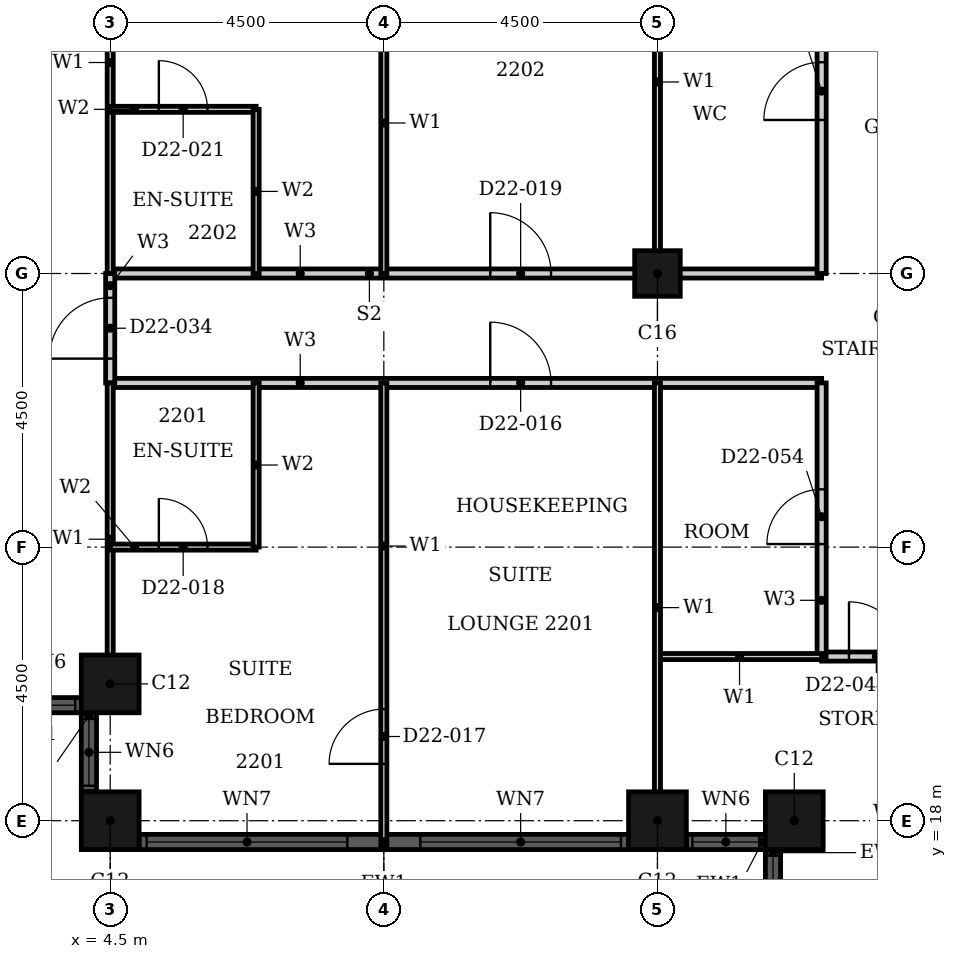
"""IFC4 building model, lengths in metres.
Left out: names, types, materials, properties, quantities, classifications, styles, units other than length and angle.
Written with IfcOpenShell. Run it as: python <this file> out.ifc"""

import sys

from ifc_helpers import new_model, si_unit, direction, frame, frame_2d, origin, origin_2d, place, context, subcontext, project, spatial, rectangle, hollow_rectangle, extrude, element, fill, save


model = new_model("IFC4")
c1 = context("Model", 3, precision=1e-05, world=origin(), true_north=direction((0.0, 1.0)))
c2 = subcontext(c1, "Body", "Model", "MODEL_VIEW")
j1 = project(units=[si_unit("LENGTHUNIT", "METRE"), si_unit("PLANEANGLEUNIT", "RADIAN")], contexts=[c1])
p1 = place(None, origin())
s1 = spatial("IfcSite", under=j1, at=p1, CompositionType="ELEMENT")
p2 = place(p1, origin())
s2 = spatial("IfcBuilding", under=s1, at=p2, CompositionType="ELEMENT")
p3 = place(p2, frame((0.0, 0.0, 92.4)))
s3 = spatial("IfcBuildingStorey", under=s2, at=p3, CompositionType="ELEMENT", Elevation=92.4)
for number, where, z_axis, x_axis in (
    (1, (4.5, 20.25, 0.0), (0.0, 0.0, 1.0), (1.0, 0.0, 0.0)),
    (2, (4.5, 18.0, 0.0), (0.0, 0.0, 1.0), (1.0, 0.0, 0.0)),
    (3, (13.5, 18.0, 0.0), (0.0, 0.0, 1.0), (1.0, 0.0, 0.0)),
    (4, (15.75, 18.0, 0.0), (0.0, 0.0, 1.0), (1.0, 0.0, 0.0)),
):
    element("IfcColumn", number, at=place(p3, frame(where, z_axis=z_axis, x_axis=x_axis)), inside=s3, PredefinedType="COLUMN", context=c2, shape_type="SweptSolid", body=[
        extrude(hollow_rectangle(XDim=0.95, YDim=0.95, WallThickness=0.03, at=origin_2d()), origin(), (0.0, 0.0, 1.0), 3.6),
    ])
p4 = place(p3, frame((13.5, 27.0, 0.0), z_axis=(0.0, 0.0, 1.0), x_axis=(1.0, 0.0, 0.0)))
e5 = element("IfcColumn", 5, at=p4, inside=s3, PredefinedType="COLUMN", context=c2, shape_type="SweptSolid", body=[
    extrude(hollow_rectangle(XDim=0.75, YDim=0.75, WallThickness=0.024, at=origin_2d()), origin(), (0.0, 0.0, 1.0), 3.6),
])
p5 = place(p3, frame((2.725, 19.9, 0.0), z_axis=(0.0, 0.0, 1.0), x_axis=(1.0, 0.0, 0.0)))
e6 = element("IfcWall", 6, at=p5, inside=s3, PredefinedType="SOLIDWALL", context=c2, shape_type="SweptSolid", body=[
    extrude(rectangle(XDim=1.3, YDim=0.25, at=frame_2d((0.65, 0.0))), origin(), (0.0, 0.0, 1.0), 3.6),
])
p6 = place(p5, frame((0.1, 0.0, 0.9)))
e7 = element("IfcOpeningElement", 7, at=p6, cuts=e6, PredefinedType="OPENING", context=c2, shape_type="SweptSolid", body=[
    extrude(rectangle(XDim=1.1, YDim=1.85, at=frame_2d((0.55, 0.925))), frame((0.0, 0.135, 0.0), z_axis=(0.0, -1.0, 0.0), x_axis=(1.0, 0.0, 0.0)), (0.0, 0.0, 1.0), 0.27),
])
p7 = place(p3, frame((4.15, 19.775, 0.0), z_axis=(0.0, 0.0, 1.0), x_axis=(0.0, -1.0, 0.0)))
e8 = element("IfcWall", 8, at=p7, inside=s3, PredefinedType="SOLIDWALL", context=c2, shape_type="SweptSolid", body=[
    extrude(rectangle(XDim=1.3, YDim=0.25, at=frame_2d((0.65, 0.0))), origin(), (0.0, 0.0, 1.0), 3.6),
])
p8 = place(p7, frame((0.1, 0.0, 0.9)))
e9 = element("IfcOpeningElement", 9, at=p8, cuts=e8, PredefinedType="OPENING", context=c2, shape_type="SweptSolid", body=[
    extrude(rectangle(XDim=1.1, YDim=1.85, at=frame_2d((0.55, 0.925))), frame((0.0, 0.135, 0.0), z_axis=(0.0, -1.0, 0.0), x_axis=(1.0, 0.0, 0.0)), (0.0, 0.0, 1.0), 0.27),
])
p9 = place(p3, frame((4.975, 17.65, 0.0), z_axis=(0.0, 0.0, 1.0), x_axis=(1.0, 0.0, 0.0)))
e10 = element("IfcWall", 10, at=p9, inside=s3, PredefinedType="SOLIDWALL", context=c2, shape_type="SweptSolid", body=[
    extrude(rectangle(XDim=8.05, YDim=0.25, at=frame_2d((4.025, 0.0))), origin(), (0.0, 0.0, 1.0), 3.6),
])
p10 = place(p9, frame((0.125, 0.0, 0.9)))
e11 = element("IfcOpeningElement", 11, at=p10, cuts=e10, PredefinedType="OPENING", context=c2, shape_type="SweptSolid", body=[
    extrude(rectangle(XDim=3.3, YDim=1.85, at=frame_2d((1.65, 0.925))), frame((0.0, 0.135, 0.0), z_axis=(0.0, -1.0, 0.0), x_axis=(1.0, 0.0, 0.0)), (0.0, 0.0, 1.0), 0.27),
])
p11 = place(p9, frame((4.625, 0.0, 0.9)))
e12 = element("IfcOpeningElement", 12, at=p11, cuts=e10, PredefinedType="OPENING", context=c2, shape_type="SweptSolid", body=[
    extrude(rectangle(XDim=3.3, YDim=1.85, at=frame_2d((1.65, 0.925))), frame((0.0, 0.135, 0.0), z_axis=(0.0, -1.0, 0.0), x_axis=(1.0, 0.0, 0.0)), (0.0, 0.0, 1.0), 0.27),
])
p12 = place(p3, frame((13.975, 17.65, 0.0), z_axis=(0.0, 0.0, 1.0), x_axis=(1.0, 0.0, 0.0)))
e13 = element("IfcWall", 13, at=p12, inside=s3, PredefinedType="SOLIDWALL", context=c2, shape_type="SweptSolid", body=[
    extrude(rectangle(XDim=1.3, YDim=0.25, at=frame_2d((0.65, 0.0))), origin(), (0.0, 0.0, 1.0), 3.6),
])
p13 = place(p12, frame((0.1, 0.0, 0.9)))
e14 = element("IfcOpeningElement", 14, at=p13, cuts=e13, PredefinedType="OPENING", context=c2, shape_type="SweptSolid", body=[
    extrude(rectangle(XDim=1.1, YDim=1.85, at=frame_2d((0.55, 0.925))), frame((0.0, 0.135, 0.0), z_axis=(0.0, -1.0, 0.0), x_axis=(1.0, 0.0, 0.0)), (0.0, 0.0, 1.0), 0.27),
])
p14 = place(p3, frame((15.4, 17.525, 0.0), z_axis=(0.0, 0.0, 1.0), x_axis=(0.0, -1.0, 0.0)))
e15 = element("IfcWall", 15, at=p14, inside=s3, PredefinedType="SOLIDWALL", context=c2, shape_type="SweptSolid", body=[
    extrude(rectangle(XDim=1.3, YDim=0.25, at=frame_2d((0.65, 0.0))), origin(), (0.0, 0.0, 1.0), 3.6),
])
p15 = place(p14, frame((0.1, 0.0, 0.9)))
e16 = element("IfcOpeningElement", 16, at=p15, cuts=e15, PredefinedType="OPENING", context=c2, shape_type="SweptSolid", body=[
    extrude(rectangle(XDim=1.1, YDim=1.85, at=frame_2d((0.55, 0.925))), frame((0.0, 0.135, 0.0), z_axis=(0.0, -1.0, 0.0), x_axis=(1.0, 0.0, 0.0)), (0.0, 0.0, 1.0), 0.27),
])
p16 = place(p3, frame((16.2, 20.7, 0.0), z_axis=(0.0, 0.0, 1.0), x_axis=(1.0, 0.0, 0.0)))
e17 = element("IfcWall", 17, at=p16, inside=s3, PredefinedType="PARTITIONING", context=c2, shape_type="SweptSolid", body=[
    extrude(rectangle(XDim=13.5, YDim=0.15, at=frame_2d((6.75, 0.0))), origin(), (0.0, 0.0, 1.0), 3.2),
])
p17 = place(p16, frame((4.75, 0.0, 0.0)))
e18 = element("IfcOpeningElement", 18, at=p17, cuts=e17, PredefinedType="OPENING", context=c2, shape_type="SweptSolid", body=[
    extrude(rectangle(XDim=1.0, YDim=2.1, at=frame_2d((0.5, 1.05))), frame((0.0, 0.085, 0.0), z_axis=(0.0, -1.0, 0.0), x_axis=(1.0, 0.0, 0.0)), (0.0, 0.0, 1.0), 0.17),
])
p18 = place(p16, frame((0.45, 0.0, 0.0)))
e19 = element("IfcOpeningElement", 19, at=p18, cuts=e17, PredefinedType="OPENING", context=c2, shape_type="SweptSolid", body=[
    extrude(rectangle(XDim=0.9, YDim=2.1, at=frame_2d((0.45, 1.05))), frame((0.0, 0.085, 0.0), z_axis=(0.0, -1.0, 0.0), x_axis=(1.0, 0.0, 0.0)), (0.0, 0.0, 1.0), 0.17),
])
p19 = place(p16, frame((7.35, 0.0, 0.0)))
e20 = element("IfcOpeningElement", 20, at=p19, cuts=e17, PredefinedType="OPENING", context=c2, shape_type="SweptSolid", body=[
    extrude(rectangle(XDim=0.9, YDim=2.1, at=frame_2d((0.45, 1.05))), frame((0.0, 0.085, 0.0), z_axis=(0.0, -1.0, 0.0), x_axis=(1.0, 0.0, 0.0)), (0.0, 0.0, 1.0), 0.17),
])
p20 = place(p16, frame((10.95, 0.0, 0.0)))
e21 = element("IfcOpeningElement", 21, at=p20, cuts=e17, PredefinedType="OPENING", context=c2, shape_type="SweptSolid", body=[
    extrude(rectangle(XDim=0.9, YDim=2.1, at=frame_2d((0.45, 1.05))), frame((0.0, 0.085, 0.0), z_axis=(0.0, -1.0, 0.0), x_axis=(1.0, 0.0, 0.0)), (0.0, 0.0, 1.0), 0.17),
])
p21 = place(p3, frame((4.5, 25.2, 0.0), z_axis=(0.0, 0.0, 1.0), x_axis=(1.0, 0.0, 0.0)))
e22 = element("IfcWall", 22, at=p21, inside=s3, PredefinedType="PARTITIONING", context=c2, shape_type="SweptSolid", body=[
    extrude(rectangle(XDim=11.7, YDim=0.15, at=frame_2d((5.85, 0.0))), origin(), (0.0, 0.0, 1.0), 3.2),
])
p22 = place(p21, frame((6.25, 0.0, 0.0)))
e23 = element("IfcOpeningElement", 23, at=p22, cuts=e22, PredefinedType="OPENING", context=c2, shape_type="SweptSolid", body=[
    extrude(rectangle(XDim=1.0, YDim=2.1, at=frame_2d((0.5, 1.05))), frame((0.0, 0.085, 0.0), z_axis=(0.0, -1.0, 0.0), x_axis=(1.0, 0.0, 0.0)), (0.0, 0.0, 1.0), 0.17),
])
p23 = place(p3, frame((4.5, 27.0, 0.0), z_axis=(0.0, 0.0, 1.0), x_axis=(1.0, 0.0, 0.0)))
e24 = element("IfcWall", 24, at=p23, inside=s3, PredefinedType="PARTITIONING", context=c2, shape_type="SweptSolid", body=[
    extrude(rectangle(XDim=11.7, YDim=0.15, at=frame_2d((5.85, 0.0))), origin(), (0.0, 0.0, 1.0), 2.48),
])
p24 = place(p23, frame((6.25, 0.0, 0.0)))
e25 = element("IfcOpeningElement", 25, at=p24, cuts=e24, PredefinedType="OPENING", context=c2, shape_type="SweptSolid", body=[
    extrude(rectangle(XDim=1.0, YDim=2.1, at=frame_2d((0.5, 1.05))), frame((0.0, 0.085, 0.0), z_axis=(0.0, -1.0, 0.0), x_axis=(1.0, 0.0, 0.0)), (0.0, 0.0, 1.0), 0.17),
])
p25 = place(p3, frame((16.2, 27.0, 0.0), z_axis=(0.0, 0.0, 1.0), x_axis=(0.0, 1.0, 0.0)))
e26 = element("IfcWall", 26, at=p25, inside=s3, PredefinedType="PARTITIONING", context=c2, shape_type="SweptSolid", body=[
    extrude(rectangle(XDim=6.3, YDim=0.15, at=frame_2d((3.15, 0.0))), origin(), (0.0, 0.0, 1.0), 3.2),
])
p26 = place(p25, frame((2.525, 0.0, 0.0)))
e27 = element("IfcOpeningElement", 27, at=p26, cuts=e26, PredefinedType="OPENING", context=c2, shape_type="SweptSolid", body=[
    extrude(rectangle(XDim=0.95, YDim=2.1, at=frame_2d((0.475, 1.05))), frame((0.0, 0.085, 0.0), z_axis=(0.0, -1.0, 0.0), x_axis=(1.0, 0.0, 0.0)), (0.0, 0.0, 1.0), 0.17),
])
p27 = place(p3, frame((16.2, 20.7, 0.0), z_axis=(0.0, 0.0, 1.0), x_axis=(0.0, 1.0, 0.0)))
e28 = element("IfcWall", 28, at=p27, inside=s3, PredefinedType="PARTITIONING", context=c2, shape_type="SweptSolid", body=[
    extrude(rectangle(XDim=4.5, YDim=0.15, at=frame_2d((2.25, 0.0))), origin(), (0.0, 0.0, 1.0), 3.2),
])
p28 = place(p27, frame((1.85, 0.0, 0.0)))
e29 = element("IfcOpeningElement", 29, at=p28, cuts=e28, PredefinedType="OPENING", context=c2, shape_type="SweptSolid", body=[
    extrude(rectangle(XDim=0.9, YDim=2.1, at=frame_2d((0.45, 1.05))), frame((0.0, 0.085, 0.0), z_axis=(0.0, -1.0, 0.0), x_axis=(1.0, 0.0, 0.0)), (0.0, 0.0, 1.0), 0.17),
])
p29 = place(p3, frame((4.5, 25.2, 0.0), z_axis=(0.0, 0.0, 1.0), x_axis=(0.0, 1.0, 0.0)))
e30 = element("IfcWall", 30, at=p29, inside=s3, PredefinedType="PARTITIONING", context=c2, shape_type="SweptSolid", body=[
    extrude(rectangle(XDim=1.8, YDim=0.15, at=frame_2d((0.9, 0.0))), origin(), (0.0, 0.0, 1.0), 3.2),
])
p30 = place(p29, frame((0.4, 0.0, 0.0)))
e31 = element("IfcOpeningElement", 31, at=p30, cuts=e30, PredefinedType="OPENING", context=c2, shape_type="SweptSolid", body=[
    extrude(rectangle(XDim=1.0, YDim=2.1, at=frame_2d((0.5, 1.05))), frame((0.0, 0.085, 0.0), z_axis=(0.0, -1.0, 0.0), x_axis=(1.0, 0.0, 0.0)), (0.0, 0.0, 1.0), 0.17),
])
p31 = place(p3, frame((13.5, 20.7, 0.0), z_axis=(0.0, 0.0, 1.0), x_axis=(1.0, 0.0, 0.0)))
e32 = element("IfcWall", 32, at=p31, inside=s3, PredefinedType="PARTITIONING", context=c2, shape_type="SweptSolid", body=[
    extrude(rectangle(XDim=2.7, YDim=0.1, at=frame_2d((1.35, 0.0))), origin(), (0.0, 0.0, 1.0), 3.2),
])
p32 = place(p3, frame((13.5, 27.0, 0.0), z_axis=(0.0, 0.0, 1.0), x_axis=(0.0, 1.0, 0.0)))
e33 = element("IfcWall", 33, at=p32, inside=s3, PredefinedType="PARTITIONING", context=c2, shape_type="SweptSolid", body=[
    extrude(rectangle(XDim=6.3, YDim=0.1, at=frame_2d((3.15, 0.0))), origin(), (0.0, 0.0, 1.0), 2.28),
])
p33 = place(p3, frame((13.5, 17.81, 0.0), z_axis=(0.0, 0.0, 1.0), x_axis=(0.0, 1.0, 0.0)))
e34 = element("IfcWall", 34, at=p33, inside=s3, PredefinedType="PARTITIONING", context=c2, shape_type="SweptSolid", body=[
    extrude(rectangle(XDim=7.39, YDim=0.1, at=frame_2d((3.695, 0.0))), origin(), (0.0, 0.0, 1.0), 2.28),
])
p34 = place(p3, frame((4.5, 27.0, 0.0), z_axis=(0.0, 0.0, 1.0), x_axis=(0.0, 1.0, 0.0)))
e35 = element("IfcWall", 35, at=p34, inside=s3, PredefinedType="PARTITIONING", context=c2, shape_type="SweptSolid", body=[
    extrude(rectangle(XDim=6.94, YDim=0.1, at=frame_2d((3.47, 0.0))), origin(), (0.0, 0.0, 1.0), 3.2),
])
p35 = place(p3, frame((4.5, 20.06, 0.0), z_axis=(0.0, 0.0, 1.0), x_axis=(0.0, 1.0, 0.0)))
e36 = element("IfcWall", 36, at=p35, inside=s3, PredefinedType="PARTITIONING", context=c2, shape_type="SweptSolid", body=[
    extrude(rectangle(XDim=5.14, YDim=0.1, at=frame_2d((2.57, 0.0))), origin(), (0.0, 0.0, 1.0), 3.2),
])
p36 = place(p3, frame((9.0, 27.0, 0.0), z_axis=(0.0, 0.0, 1.0), x_axis=(0.0, 1.0, 0.0)))
e37 = element("IfcWall", 37, at=p36, inside=s3, PredefinedType="PARTITIONING", context=c2, shape_type="SweptSolid", body=[
    extrude(rectangle(XDim=9.415, YDim=0.1, at=frame_2d((4.708, 0.0))), origin(), (0.0, 0.0, 1.0), 3.2),
])
p37 = place(p36, frame((4.95, 0.0, 0.0)))
e38 = element("IfcOpeningElement", 38, at=p37, cuts=e37, PredefinedType="OPENING", context=c2, shape_type="SweptSolid", body=[
    extrude(rectangle(XDim=0.9, YDim=2.1, at=frame_2d((0.45, 1.05))), frame((0.0, 0.06, 0.0), z_axis=(0.0, -1.0, 0.0), x_axis=(1.0, 0.0, 0.0)), (0.0, 0.0, 1.0), 0.12),
])
p38 = place(p3, frame((9.0, 17.585, 0.0), z_axis=(0.0, 0.0, 1.0), x_axis=(0.0, 1.0, 0.0)))
e39 = element("IfcWall", 39, at=p38, inside=s3, PredefinedType="PARTITIONING", context=c2, shape_type="SweptSolid", body=[
    extrude(rectangle(XDim=7.615, YDim=0.1, at=frame_2d((3.808, 0.0))), origin(), (0.0, 0.0, 1.0), 3.2),
])
p39 = place(p38, frame((1.35, 0.0, 0.0)))
e40 = element("IfcOpeningElement", 40, at=p39, cuts=e39, PredefinedType="OPENING", context=c2, shape_type="SweptSolid", body=[
    extrude(rectangle(XDim=0.9, YDim=2.1, at=frame_2d((0.45, 1.05))), frame((0.0, 0.06, 0.0), z_axis=(0.0, -1.0, 0.0), x_axis=(1.0, 0.0, 0.0)), (0.0, 0.0, 1.0), 0.12),
])
p40 = place(p3, frame((4.5, 22.5, 0.0), z_axis=(0.0, 0.0, 1.0), x_axis=(1.0, 0.0, 0.0)))
e41 = element("IfcWall", 41, at=p40, inside=s3, PredefinedType="PARTITIONING", context=c2, shape_type="SweptSolid", body=[
    extrude(rectangle(XDim=2.4, YDim=0.1, at=frame_2d((1.2, 0.0))), origin(), (0.0, 0.0, 1.0), 2.48),
])
p41 = place(p40, frame((0.8, 0.0, 0.0)))
e42 = element("IfcOpeningElement", 42, at=p41, cuts=e41, PredefinedType="OPENING", context=c2, shape_type="SweptSolid", body=[
    extrude(rectangle(XDim=0.8, YDim=2.1, at=frame_2d((0.4, 1.05))), frame((0.0, 0.06, 0.0), z_axis=(0.0, -1.0, 0.0), x_axis=(1.0, 0.0, 0.0)), (0.0, 0.0, 1.0), 0.12),
])
p42 = place(p3, frame((4.5, 29.7, 0.0), z_axis=(0.0, 0.0, 1.0), x_axis=(1.0, 0.0, 0.0)))
e43 = element("IfcWall", 43, at=p42, inside=s3, PredefinedType="PARTITIONING", context=c2, shape_type="SweptSolid", body=[
    extrude(rectangle(XDim=2.4, YDim=0.1, at=frame_2d((1.2, 0.0))), origin(), (0.0, 0.0, 1.0), 3.2),
])
p43 = place(p42, frame((0.8, 0.0, 0.0)))
e44 = element("IfcOpeningElement", 44, at=p43, cuts=e43, PredefinedType="OPENING", context=c2, shape_type="SweptSolid", body=[
    extrude(rectangle(XDim=0.8, YDim=2.1, at=frame_2d((0.4, 1.05))), frame((0.0, 0.06, 0.0), z_axis=(0.0, -1.0, 0.0), x_axis=(1.0, 0.0, 0.0)), (0.0, 0.0, 1.0), 0.12),
])
for number, where, z_axis, x_axis in (
    (45, (6.9, 27.0, 0.0), (0.0, 0.0, 1.0), (0.0, 1.0, 0.0)),
    (46, (6.9, 22.5, 0.0), (0.0, 0.0, 1.0), (0.0, 1.0, 0.0)),
):
    element("IfcWall", number, at=place(p3, frame(where, z_axis=z_axis, x_axis=x_axis)), inside=s3, PredefinedType="PARTITIONING", context=c2, shape_type="SweptSolid", body=[
        extrude(rectangle(XDim=2.7, YDim=0.1, at=frame_2d((1.35, 0.0))), origin(), (0.0, 0.0, 1.0), 3.2),
    ])
p44 = place(p6, origin())
e47 = element("IfcWindow", 47, at=p44, inside=s3, PartitioningType="SINGLE_PANEL", PredefinedType="WINDOW", context=c2, shape_type="SweptSolid", body=[
    extrude(rectangle(XDim=1.1, YDim=1.85, at=frame_2d((0.55, 0.925))), frame((0.0, 0.03, 0.0), z_axis=(0.0, -1.0, 0.0), x_axis=(1.0, 0.0, 0.0)), (0.0, 0.0, 1.0), 0.06),
])
fill(e7, e47)
p45 = place(p8, origin())
e48 = element("IfcWindow", 48, at=p45, inside=s3, PartitioningType="SINGLE_PANEL", PredefinedType="WINDOW", context=c2, shape_type="SweptSolid", body=[
    extrude(rectangle(XDim=1.1, YDim=1.85, at=frame_2d((0.55, 0.925))), frame((0.0, 0.03, 0.0), z_axis=(0.0, -1.0, 0.0), x_axis=(1.0, 0.0, 0.0)), (0.0, 0.0, 1.0), 0.06),
])
fill(e9, e48)
p46 = place(p10, origin())
e49 = element("IfcWindow", 49, at=p46, inside=s3, PartitioningType="SINGLE_PANEL", PredefinedType="WINDOW", context=c2, shape_type="SweptSolid", body=[
    extrude(rectangle(XDim=3.3, YDim=1.85, at=frame_2d((1.65, 0.925))), frame((0.0, 0.03, 0.0), z_axis=(0.0, -1.0, 0.0), x_axis=(1.0, 0.0, 0.0)), (0.0, 0.0, 1.0), 0.06),
])
fill(e11, e49)
p47 = place(p11, origin())
e50 = element("IfcWindow", 50, at=p47, inside=s3, PartitioningType="SINGLE_PANEL", PredefinedType="WINDOW", context=c2, shape_type="SweptSolid", body=[
    extrude(rectangle(XDim=3.3, YDim=1.85, at=frame_2d((1.65, 0.925))), frame((0.0, 0.03, 0.0), z_axis=(0.0, -1.0, 0.0), x_axis=(1.0, 0.0, 0.0)), (0.0, 0.0, 1.0), 0.06),
])
fill(e12, e50)
p48 = place(p13, origin())
e51 = element("IfcWindow", 51, at=p48, inside=s3, PartitioningType="SINGLE_PANEL", PredefinedType="WINDOW", context=c2, shape_type="SweptSolid", body=[
    extrude(rectangle(XDim=1.1, YDim=1.85, at=frame_2d((0.55, 0.925))), frame((0.0, 0.03, 0.0), z_axis=(0.0, -1.0, 0.0), x_axis=(1.0, 0.0, 0.0)), (0.0, 0.0, 1.0), 0.06),
])
fill(e14, e51)
p49 = place(p15, origin())
e52 = element("IfcWindow", 52, at=p49, inside=s3, PartitioningType="SINGLE_PANEL", PredefinedType="WINDOW", context=c2, shape_type="SweptSolid", body=[
    extrude(rectangle(XDim=1.1, YDim=1.85, at=frame_2d((0.55, 0.925))), frame((0.0, 0.03, 0.0), z_axis=(0.0, -1.0, 0.0), x_axis=(1.0, 0.0, 0.0)), (0.0, 0.0, 1.0), 0.06),
])
fill(e16, e52)
p50 = place(p22, origin())
e53 = element("IfcDoor", 53, at=p50, inside=s3, OperationType="SINGLE_SWING_LEFT", PredefinedType="DOOR", context=c2, shape_type="SweptSolid", body=[
    extrude(rectangle(XDim=1.0, YDim=2.1, at=frame_2d((0.5, 1.05))), frame((0.0, 0.025, 0.0), z_axis=(0.0, -1.0, 0.0), x_axis=(1.0, 0.0, 0.0)), (0.0, 0.0, 1.0), 0.05),
])
fill(e23, e53)
p51 = place(p39, origin())
e54 = element("IfcDoor", 54, at=p51, inside=s3, OperationType="SINGLE_SWING_LEFT", PredefinedType="DOOR", context=c2, shape_type="SweptSolid", body=[
    extrude(rectangle(XDim=0.9, YDim=2.1, at=frame_2d((0.45, 1.05))), frame((0.0, 0.025, 0.0), z_axis=(0.0, -1.0, 0.0), x_axis=(1.0, 0.0, 0.0)), (0.0, 0.0, 1.0), 0.05),
])
fill(e40, e54)
p52 = place(p41, origin())
e55 = element("IfcDoor", 55, at=p52, inside=s3, OperationType="SINGLE_SWING_LEFT", PredefinedType="DOOR", context=c2, shape_type="SweptSolid", body=[
    extrude(rectangle(XDim=0.8, YDim=2.1, at=frame_2d((0.4, 1.05))), frame((0.0, 0.025, 0.0), z_axis=(0.0, -1.0, 0.0), x_axis=(1.0, 0.0, 0.0)), (0.0, 0.0, 1.0), 0.05),
])
fill(e42, e55)
p53 = place(p24, origin())
e56 = element("IfcDoor", 56, at=p53, inside=s3, OperationType="SINGLE_SWING_RIGHT", PredefinedType="DOOR", context=c2, shape_type="SweptSolid", body=[
    extrude(rectangle(XDim=1.0, YDim=2.1, at=frame_2d((0.5, 1.05))), frame((0.0, 0.025, 0.0), z_axis=(0.0, -1.0, 0.0), x_axis=(1.0, 0.0, 0.0)), (0.0, 0.0, 1.0), 0.05),
])
fill(e25, e56)
p54 = place(p43, origin())
e57 = element("IfcDoor", 57, at=p54, inside=s3, OperationType="SINGLE_SWING_LEFT", PredefinedType="DOOR", context=c2, shape_type="SweptSolid", body=[
    extrude(rectangle(XDim=0.8, YDim=2.1, at=frame_2d((0.4, 1.05))), frame((0.0, 0.025, 0.0), z_axis=(0.0, -1.0, 0.0), x_axis=(1.0, 0.0, 0.0)), (0.0, 0.0, 1.0), 0.05),
])
fill(e44, e57)
p55 = place(p30, origin())
e58 = element("IfcDoor", 58, at=p55, inside=s3, OperationType="SINGLE_SWING_RIGHT", PredefinedType="DOOR", context=c2, shape_type="SweptSolid", body=[
    extrude(rectangle(XDim=1.0, YDim=2.1, at=frame_2d((0.5, 1.05))), frame((0.0, 0.025, 0.0), z_axis=(0.0, -1.0, 0.0), x_axis=(1.0, 0.0, 0.0)), (0.0, 0.0, 1.0), 0.05),
])
fill(e31, e58)
p56 = place(p18, origin())
e59 = element("IfcDoor", 59, at=p56, inside=s3, OperationType="SINGLE_SWING_RIGHT", PredefinedType="DOOR", context=c2, shape_type="SweptSolid", body=[
    extrude(rectangle(XDim=0.9, YDim=2.1, at=frame_2d((0.45, 1.05))), frame((0.0, 0.025, 0.0), z_axis=(0.0, -1.0, 0.0), x_axis=(1.0, 0.0, 0.0)), (0.0, 0.0, 1.0), 0.05),
])
fill(e19, e59)
p57 = place(p28, origin())
e60 = element("IfcDoor", 60, at=p57, inside=s3, OperationType="SINGLE_SWING_RIGHT", PredefinedType="DOOR", context=c2, shape_type="SweptSolid", body=[
    extrude(rectangle(XDim=0.9, YDim=2.1, at=frame_2d((0.45, 1.05))), frame((0.0, 0.025, 0.0), z_axis=(0.0, -1.0, 0.0), x_axis=(1.0, 0.0, 0.0)), (0.0, 0.0, 1.0), 0.05),
])
fill(e29, e60)
p58 = place(p26, origin())
e61 = element("IfcDoor", 61, at=p58, inside=s3, OperationType="SINGLE_SWING_LEFT", PredefinedType="DOOR", context=c2, shape_type="SweptSolid", body=[
    extrude(rectangle(XDim=0.95, YDim=2.1, at=frame_2d((0.475, 1.05))), frame((0.0, 0.025, 0.0), z_axis=(0.0, -1.0, 0.0), x_axis=(1.0, 0.0, 0.0)), (0.0, 0.0, 1.0), 0.05),
])
fill(e27, e61)
save(model, sys.argv[1])
